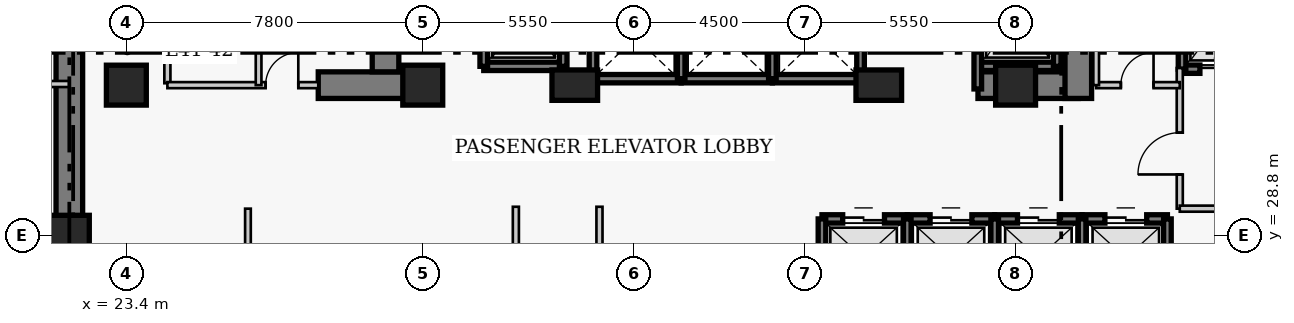
"""IFC4 building model, lengths in metres.
Left out: names, types, materials, properties, quantities, classifications, styles, units other than length and angle.
Written with IfcOpenShell. Run it as: python <this file> out.ifc"""

import sys

from ifc_helpers import new_model, si_unit, direction, frame, frame_2d, origin, origin_2d, place, context, subcontext, project, spatial, rectangle, extrude, element, fill, save


model = new_model("IFC4")
c1 = context("Model", 3, precision=1e-05, world=origin(), true_north=direction((0.0, 1.0)))
c2 = subcontext(c1, "Body", "Model", "MODEL_VIEW")
j1 = project(units=[si_unit("LENGTHUNIT", "METRE"), si_unit("PLANEANGLEUNIT", "RADIAN")], contexts=[c1])
p1 = place(None, origin())
s1 = spatial("IfcSite", under=j1, at=p1, CompositionType="ELEMENT")
p2 = place(p1, origin())
s2 = spatial("IfcBuilding", under=s1, at=p2, CompositionType="ELEMENT")
p3 = place(p2, frame((0.0, 0.0, 165.0)))
s3 = spatial("IfcBuildingStorey", under=s2, at=p3, CompositionType="ELEMENT", Elevation=165.0)
p4 = place(p3, frame((21.9, 27.05, 0.0), z_axis=(0.0, 0.0, 1.0), x_axis=(0.0, 1.0, 0.0)))
e1 = element("IfcWall", 1, at=p4, inside=s3, PredefinedType="SHEAR", context=c2, shape_type="SweptSolid", body=[
    extrude(rectangle(XDim=13.62, YDim=0.7, at=frame_2d((6.81, 0.0))), origin(), (0.0, 0.0, 1.0), 3.8),
])
p5 = place(p3, frame((28.45, 32.75, 0.0), z_axis=(0.0, 0.0, 1.0), x_axis=(1.0, 0.0, 0.0)))
e2 = element("IfcWall", 2, at=p5, inside=s3, PredefinedType="SHEAR", context=c2, shape_type="SweptSolid", body=[
    extrude(rectangle(XDim=2.4, YDim=0.7, at=frame_2d((1.2, 0.0))), origin(), (0.0, 0.0, 1.0), 3.8),
])
p6 = place(p3, frame((45.81, 32.75, 0.0), z_axis=(0.0, 0.0, 1.0), x_axis=(1.0, 0.0, 0.0)))
e3 = element("IfcWall", 3, at=p6, inside=s3, PredefinedType="SHEAR", context=c2, shape_type="SweptSolid", body=[
    extrude(rectangle(XDim=2.64, YDim=0.7, at=frame_2d((1.32, 0.0))), origin(), (0.0, 0.0, 1.0), 3.8),
])
p7 = place(p3, frame((30.22, 33.1, 0.0), z_axis=(0.0, 0.0, 1.0), x_axis=(0.0, 1.0, 0.0)))
e4 = element("IfcWall", 4, at=p7, inside=s3, PredefinedType="SHEAR", context=c2, shape_type="SweptSolid", body=[
    extrude(rectangle(XDim=7.22, YDim=0.7, at=frame_2d((3.61, 0.0))), origin(), (0.0, 0.0, 1.0), 3.8),
])
p8 = place(p3, frame((48.45, 32.4, 0.0), z_axis=(0.0, 0.0, 1.0), x_axis=(0.0, 1.0, 0.0)))
e5 = element("IfcWall", 5, at=p8, inside=s3, PredefinedType="SHEAR", context=c2, shape_type="SweptSolid", body=[
    extrude(rectangle(XDim=7.92, YDim=0.7, at=frame_2d((3.96, 0.0))), origin(), (0.0, 0.0, 1.0), 3.8),
])
p9 = place(p8, frame((5.8, 0.0, 0.0)))
e6 = element("IfcOpeningElement", 6, at=p9, cuts=e5, PredefinedType="OPENING", context=c2, shape_type="SweptSolid", body=[
    extrude(rectangle(XDim=1.1, YDim=2.15, at=frame_2d((0.55, 1.075))), frame((0.0, 0.36, 0.0), z_axis=(0.0, -1.0, 0.0), x_axis=(1.0, 0.0, 0.0)), (0.0, 0.0, 1.0), 0.72),
])
for number, where, z_axis, x_axis in (
    (7, (21.9, 28.8, 0.0), (0.0, 0.0, 1.0), (1.0, 0.0, 0.0)),
    (8, (23.4, 32.75, 0.0), (0.0, 0.0, 1.0), (1.0, 0.0, 0.0)),
    (9, (31.2, 32.75, 0.0), (0.0, 0.0, 1.0), (1.0, 0.0, 0.0)),
):
    element("IfcColumn", number, at=place(p3, frame(where, z_axis=z_axis, x_axis=x_axis)), inside=s3, PredefinedType="COLUMN", context=c2, shape_type="SweptSolid", body=[
        extrude(rectangle(XDim=1.05, YDim=1.05, at=origin_2d()), origin(), (0.0, 0.0, 1.0), 3.8),
    ])
for number, where, z_axis, x_axis in (
    (10, (35.2, 32.75, 0.0), (0.0, 0.0, 1.0), (1.0, 0.0, 0.0)),
    (11, (43.2, 32.75, 0.0), (0.0, 0.0, 1.0), (1.0, 0.0, 0.0)),
):
    element("IfcColumn", number, at=place(p3, frame(where, z_axis=z_axis, x_axis=x_axis)), inside=s3, PredefinedType="COLUMN", context=c2, shape_type="SweptSolid", body=[
        extrude(rectangle(XDim=1.2, YDim=0.8, at=origin_2d()), origin(), (0.0, 0.0, 1.0), 3.8),
    ])
p10 = place(p3, frame((46.8, 32.75, 0.0), z_axis=(0.0, 0.0, 1.0), x_axis=(1.0, 0.0, 0.0)))
e12 = element("IfcColumn", 12, at=p10, inside=s3, PredefinedType="COLUMN", context=c2, shape_type="SweptSolid", body=[
    extrude(rectangle(XDim=1.05, YDim=1.05, at=origin_2d()), origin(), (0.0, 0.0, 1.0), 3.8),
])
p11 = place(p3, frame((41.705, 29.23, 0.0), z_axis=(0.0, 0.0, 1.0), x_axis=(1.0, 0.0, 0.0)))
e13 = element("IfcWall", 13, at=p11, inside=s3, PredefinedType="SHEAR", context=c2, shape_type="SweptSolid", body=[
    extrude(rectangle(XDim=2.245, YDim=0.22, at=frame_2d((1.123, 0.0))), origin(), (0.0, 0.0, 1.0), 3.8),
])
p12 = place(p11, frame((0.545, 0.0, 0.0)))
e14 = element("IfcOpeningElement", 14, at=p12, cuts=e13, PredefinedType="OPENING", context=c2, shape_type="SweptSolid", body=[
    extrude(rectangle(XDim=1.1, YDim=2.15, at=frame_2d((0.55, 1.075))), frame((0.0, 0.12, 0.0), z_axis=(0.0, -1.0, 0.0), x_axis=(1.0, 0.0, 0.0)), (0.0, 0.0, 1.0), 0.24),
])
p13 = place(p3, frame((41.705, 27.17, 0.0), z_axis=(0.0, 0.0, 1.0), x_axis=(0.0, 1.0, 0.0)))
e15 = element("IfcWall", 15, at=p13, inside=s3, PredefinedType="SHEAR", context=c2, shape_type="SweptSolid", body=[
    extrude(rectangle(XDim=2.06, YDim=0.2, at=frame_2d((1.03, 0.0))), origin(), (0.0, 0.0, 1.0), 3.8),
])
p14 = place(p3, frame((43.95, 29.23, 0.0), z_axis=(0.0, 0.0, 1.0), x_axis=(1.0, 0.0, 0.0)))
e16 = element("IfcWall", 16, at=p14, inside=s3, PredefinedType="SHEAR", context=c2, shape_type="SweptSolid", body=[
    extrude(rectangle(XDim=2.3, YDim=0.22, at=frame_2d((1.15, 0.0))), origin(), (0.0, 0.0, 1.0), 3.8),
])
p15 = place(p14, frame((0.6, 0.0, 0.0)))
e17 = element("IfcOpeningElement", 17, at=p15, cuts=e16, PredefinedType="OPENING", context=c2, shape_type="SweptSolid", body=[
    extrude(rectangle(XDim=1.1, YDim=2.15, at=frame_2d((0.55, 1.075))), frame((0.0, 0.12, 0.0), z_axis=(0.0, -1.0, 0.0), x_axis=(1.0, 0.0, 0.0)), (0.0, 0.0, 1.0), 0.24),
])
p16 = place(p3, frame((43.95, 27.17, 0.0), z_axis=(0.0, 0.0, 1.0), x_axis=(0.0, 1.0, 0.0)))
e18 = element("IfcWall", 18, at=p16, inside=s3, PredefinedType="SHEAR", context=c2, shape_type="SweptSolid", body=[
    extrude(rectangle(XDim=2.06, YDim=0.2, at=frame_2d((1.03, 0.0))), origin(), (0.0, 0.0, 1.0), 3.8),
])
p17 = place(p3, frame((46.25, 29.23, 0.0), z_axis=(0.0, 0.0, 1.0), x_axis=(1.0, 0.0, 0.0)))
e19 = element("IfcWall", 19, at=p17, inside=s3, PredefinedType="SHEAR", context=c2, shape_type="SweptSolid", body=[
    extrude(rectangle(XDim=2.3, YDim=0.22, at=frame_2d((1.15, 0.0))), origin(), (0.0, 0.0, 1.0), 3.8),
])
p18 = place(p17, frame((0.6, 0.0, 0.0)))
e20 = element("IfcOpeningElement", 20, at=p18, cuts=e19, PredefinedType="OPENING", context=c2, shape_type="SweptSolid", body=[
    extrude(rectangle(XDim=1.1, YDim=2.15, at=frame_2d((0.55, 1.075))), frame((0.0, 0.12, 0.0), z_axis=(0.0, -1.0, 0.0), x_axis=(1.0, 0.0, 0.0)), (0.0, 0.0, 1.0), 0.24),
])
p19 = place(p3, frame((46.25, 27.17, 0.0), z_axis=(0.0, 0.0, 1.0), x_axis=(0.0, 1.0, 0.0)))
e21 = element("IfcWall", 21, at=p19, inside=s3, PredefinedType="SHEAR", context=c2, shape_type="SweptSolid", body=[
    extrude(rectangle(XDim=2.06, YDim=0.2, at=frame_2d((1.03, 0.0))), origin(), (0.0, 0.0, 1.0), 3.8),
])
p20 = place(p3, frame((48.55, 29.23, 0.0), z_axis=(0.0, 0.0, 1.0), x_axis=(1.0, 0.0, 0.0)))
e22 = element("IfcWall", 22, at=p20, inside=s3, PredefinedType="SHEAR", context=c2, shape_type="SweptSolid", body=[
    extrude(rectangle(XDim=2.245, YDim=0.22, at=frame_2d((1.123, 0.0))), origin(), (0.0, 0.0, 1.0), 3.8),
])
p21 = place(p20, frame((0.6, 0.0, 0.0)))
e23 = element("IfcOpeningElement", 23, at=p21, cuts=e22, PredefinedType="OPENING", context=c2, shape_type="SweptSolid", body=[
    extrude(rectangle(XDim=1.1, YDim=2.15, at=frame_2d((0.55, 1.075))), frame((0.0, 0.12, 0.0), z_axis=(0.0, -1.0, 0.0), x_axis=(1.0, 0.0, 0.0)), (0.0, 0.0, 1.0), 0.24),
])
for number, where, z_axis, x_axis in (
    (24, (48.55, 27.17, 0.0), (0.0, 0.0, 1.0), (0.0, 1.0, 0.0)),
    (25, (50.795, 27.17, 0.0), (0.0, 0.0, 1.0), (0.0, 1.0, 0.0)),
):
    element("IfcWall", number, at=place(p3, frame(where, z_axis=z_axis, x_axis=x_axis)), inside=s3, PredefinedType="SHEAR", context=c2, shape_type="SweptSolid", body=[
        extrude(rectangle(XDim=2.06, YDim=0.2, at=frame_2d((1.03, 0.0))), origin(), (0.0, 0.0, 1.0), 3.8),
    ])
p22 = place(p3, frame((35.68, 32.92, 0.0), z_axis=(0.0, 0.0, 1.0), x_axis=(1.0, 0.0, 0.0)))
e26 = element("IfcWall", 26, at=p22, inside=s3, PredefinedType="SHEAR", context=c2, shape_type="SweptSolid", body=[
    extrude(rectangle(XDim=2.32, YDim=0.22, at=frame_2d((1.16, 0.0))), origin(), (0.0, 0.0, 1.0), 3.8),
])
p23 = place(p3, frame((35.68, 32.92, 0.0), z_axis=(0.0, 0.0, 1.0), x_axis=(0.0, 1.0, 0.0)))
e27 = element("IfcWall", 27, at=p23, inside=s3, PredefinedType="SHEAR", context=c2, shape_type="SweptSolid", body=[
    extrude(rectangle(XDim=2.16, YDim=0.2, at=frame_2d((1.08, 0.0))), origin(), (0.0, 0.0, 1.0), 3.8),
])
p24 = place(p3, frame((38.0, 32.92, 0.0), z_axis=(0.0, 0.0, 1.0), x_axis=(1.0, 0.0, 0.0)))
e28 = element("IfcWall", 28, at=p24, inside=s3, PredefinedType="SHEAR", context=c2, shape_type="SweptSolid", body=[
    extrude(rectangle(XDim=2.4, YDim=0.22, at=frame_2d((1.2, 0.0))), origin(), (0.0, 0.0, 1.0), 3.8),
])
p25 = place(p3, frame((38.0, 32.92, 0.0), z_axis=(0.0, 0.0, 1.0), x_axis=(0.0, 1.0, 0.0)))
e29 = element("IfcWall", 29, at=p25, inside=s3, PredefinedType="SHEAR", context=c2, shape_type="SweptSolid", body=[
    extrude(rectangle(XDim=2.16, YDim=0.2, at=frame_2d((1.08, 0.0))), origin(), (0.0, 0.0, 1.0), 3.8),
])
p26 = place(p3, frame((40.4, 32.92, 0.0), z_axis=(0.0, 0.0, 1.0), x_axis=(1.0, 0.0, 0.0)))
e30 = element("IfcWall", 30, at=p26, inside=s3, PredefinedType="SHEAR", context=c2, shape_type="SweptSolid", body=[
    extrude(rectangle(XDim=2.32, YDim=0.22, at=frame_2d((1.16, 0.0))), origin(), (0.0, 0.0, 1.0), 3.8),
])
for number, where, z_axis, x_axis in (
    (31, (40.4, 32.92, 0.0), (0.0, 0.0, 1.0), (0.0, 1.0, 0.0)),
    (32, (42.72, 32.92, 0.0), (0.0, 0.0, 1.0), (0.0, 1.0, 0.0)),
):
    element("IfcWall", number, at=place(p3, frame(where, z_axis=z_axis, x_axis=x_axis)), inside=s3, PredefinedType="SHEAR", context=c2, shape_type="SweptSolid", body=[
        extrude(rectangle(XDim=2.16, YDim=0.2, at=frame_2d((1.08, 0.0))), origin(), (0.0, 0.0, 1.0), 3.8),
    ])
p27 = place(p3, frame((51.18, 33.17, 0.0), z_axis=(0.0, 0.0, 1.0), x_axis=(1.0, 0.0, 0.0)))
e33 = element("IfcWall", 33, at=p27, inside=s3, PredefinedType="SHEAR", context=c2, shape_type="SweptSolid", body=[
    extrude(rectangle(XDim=2.42, YDim=0.22, at=frame_2d((1.21, 0.0))), origin(), (0.0, 0.0, 1.0), 3.8),
])
p28 = place(p27, frame((0.47, 0.0, 0.0)))
e34 = element("IfcOpeningElement", 34, at=p28, cuts=e33, PredefinedType="OPENING", context=c2, shape_type="SweptSolid", body=[
    extrude(rectangle(XDim=1.3, YDim=2.15, at=frame_2d((0.65, 1.075))), frame((0.0, 0.12, 0.0), z_axis=(0.0, -1.0, 0.0), x_axis=(1.0, 0.0, 0.0)), (0.0, 0.0, 1.0), 0.24),
])
p29 = place(p3, frame((51.18, 33.17, 0.0), z_axis=(0.0, 0.0, 1.0), x_axis=(0.0, 1.0, 0.0)))
e35 = element("IfcWall", 35, at=p29, inside=s3, PredefinedType="SHEAR", context=c2, shape_type="SweptSolid", body=[
    extrude(rectangle(XDim=2.86, YDim=0.2, at=frame_2d((1.43, 0.0))), origin(), (0.0, 0.0, 1.0), 3.8),
])
p30 = place(p3, frame((32.805, 33.245, 0.0), z_axis=(0.0, 0.0, 1.0), x_axis=(1.0, 0.0, 0.0)))
e36 = element("IfcWall", 36, at=p30, inside=s3, PredefinedType="SHEAR", context=c2, shape_type="SweptSolid", body=[
    extrude(rectangle(XDim=2.09, YDim=0.22, at=frame_2d((1.045, 0.0))), origin(), (0.0, 0.0, 1.0), 3.8),
])
for number, where, z_axis, x_axis in (
    (37, (32.805, 33.245, 0.0), (0.0, 0.0, 1.0), (0.0, 1.0, 0.0)),
    (38, (34.895, 33.245, 0.0), (0.0, 0.0, 1.0), (0.0, 1.0, 0.0)),
):
    element("IfcWall", number, at=place(p3, frame(where, z_axis=z_axis, x_axis=x_axis)), inside=s3, PredefinedType="SHEAR", context=c2, shape_type="SweptSolid", body=[
        extrude(rectangle(XDim=2.91, YDim=0.2, at=frame_2d((1.455, 0.0))), origin(), (0.0, 0.0, 1.0), 3.8),
    ])
p31 = place(p3, frame((45.805, 33.245, 0.0), z_axis=(0.0, 0.0, 1.0), x_axis=(1.0, 0.0, 0.0)))
e39 = element("IfcWall", 39, at=p31, inside=s3, PredefinedType="SHEAR", context=c2, shape_type="SweptSolid", body=[
    extrude(rectangle(XDim=2.09, YDim=0.22, at=frame_2d((1.045, 0.0))), origin(), (0.0, 0.0, 1.0), 3.8),
])
p32 = place(p3, frame((45.805, 32.65, 0.0), z_axis=(0.0, 0.0, 1.0), x_axis=(0.0, 1.0, 0.0)))
e40 = element("IfcWall", 40, at=p32, inside=s3, PredefinedType="SHEAR", context=c2, shape_type="SweptSolid", body=[
    extrude(rectangle(XDim=3.505, YDim=0.2, at=frame_2d((1.752, 0.0))), origin(), (0.0, 0.0, 1.0), 3.8),
])
p33 = place(p3, frame((47.895, 33.245, 0.0), z_axis=(0.0, 0.0, 1.0), x_axis=(0.0, 1.0, 0.0)))
e41 = element("IfcWall", 41, at=p33, inside=s3, PredefinedType="SHEAR", context=c2, shape_type="SweptSolid", body=[
    extrude(rectangle(XDim=2.91, YDim=0.2, at=frame_2d((1.455, 0.0))), origin(), (0.0, 0.0, 1.0), 3.8),
])
p34 = place(p3, frame((24.48, 32.8, 0.0), z_axis=(0.0, 0.0, 1.0), x_axis=(0.0, 1.0, 0.0)))
e42 = element("IfcWall", 42, at=p34, inside=s3, PredefinedType="PARTITIONING", context=c2, shape_type="SweptSolid", body=[
    extrude(rectangle(XDim=3.57, YDim=0.16, at=frame_2d((1.785, 0.0))), origin(), (0.0, 0.0, 1.0), 3.55),
])
p35 = place(p34, frame((1.604, 0.0, 0.0)))
e43 = element("IfcOpeningElement", 43, at=p35, cuts=e42, PredefinedType="OPENING", context=c2, shape_type="SweptSolid", body=[
    extrude(rectangle(XDim=0.9, YDim=2.1, at=frame_2d((0.45, 1.05))), frame((0.0, 0.09, 0.0), z_axis=(0.0, -1.0, 0.0), x_axis=(1.0, 0.0, 0.0)), (0.0, 0.0, 1.0), 0.18),
])
p36 = place(p3, frame((51.12, 29.5, 0.0), z_axis=(0.0, 0.0, 1.0), x_axis=(0.0, 1.0, 0.0)))
e44 = element("IfcWall", 44, at=p36, inside=s3, PredefinedType="PARTITIONING", context=c2, shape_type="SweptSolid", body=[
    extrude(rectangle(XDim=3.7, YDim=0.16, at=frame_2d((1.85, 0.0))), origin(), (0.0, 0.0, 1.0), 3.55),
])
p37 = place(p36, frame((0.9, 0.0, 0.0)))
e45 = element("IfcOpeningElement", 45, at=p37, cuts=e44, PredefinedType="OPENING", context=c2, shape_type="SweptSolid", body=[
    extrude(rectangle(XDim=1.1, YDim=2.15, at=frame_2d((0.55, 1.075))), frame((0.0, 0.09, 0.0), z_axis=(0.0, -1.0, 0.0), x_axis=(1.0, 0.0, 0.0)), (0.0, 0.0, 1.0), 0.18),
])
p38 = place(p3, frame((51.12, 29.5, 0.0), z_axis=(0.0, 0.0, 1.0), x_axis=(1.0, 0.0, 0.0)))
e46 = element("IfcWall", 46, at=p38, inside=s3, PredefinedType="PARTITIONING", context=c2, shape_type="SweptSolid", body=[
    extrude(rectangle(XDim=5.63, YDim=0.16, at=frame_2d((2.815, 0.0))), origin(), (0.0, 0.0, 1.0), 3.55),
])
p39 = place(p3, frame((24.48, 32.75, 0.0), z_axis=(0.0, 0.0, 1.0), x_axis=(1.0, 0.0, 0.0)))
e47 = element("IfcWall", 47, at=p39, inside=s3, PredefinedType="PARTITIONING", context=c2, shape_type="SweptSolid", body=[
    extrude(rectangle(XDim=3.97, YDim=0.16, at=frame_2d((1.985, 0.0))), origin(), (0.0, 0.0, 1.0), 3.55),
])
p40 = place(p39, frame((2.585, 0.0, 0.0)))
e48 = element("IfcOpeningElement", 48, at=p40, cuts=e47, PredefinedType="OPENING", context=c2, shape_type="SweptSolid", body=[
    extrude(rectangle(XDim=0.86, YDim=2.05, at=frame_2d((0.43, 1.025))), frame((0.0, 0.09, 0.0), z_axis=(0.0, -1.0, 0.0), x_axis=(1.0, 0.0, 0.0)), (0.0, 0.0, 1.0), 0.18),
])
p41 = place(p3, frame((48.92, 32.75, 0.0), z_axis=(0.0, 0.0, 1.0), x_axis=(1.0, 0.0, 0.0)))
e49 = element("IfcWall", 49, at=p41, inside=s3, PredefinedType="PARTITIONING", context=c2, shape_type="SweptSolid", body=[
    extrude(rectangle(XDim=2.2, YDim=0.16, at=frame_2d((1.1, 0.0))), origin(), (0.0, 0.0, 1.0), 3.55),
])
p42 = place(p41, frame((0.65, 0.0, 0.0)))
e50 = element("IfcOpeningElement", 50, at=p42, cuts=e49, PredefinedType="OPENING", context=c2, shape_type="SweptSolid", body=[
    extrude(rectangle(XDim=0.86, YDim=2.05, at=frame_2d((0.43, 1.025))), frame((0.0, 0.09, 0.0), z_axis=(0.0, -1.0, 0.0), x_axis=(1.0, 0.0, 0.0)), (0.0, 0.0, 1.0), 0.18),
])
for number, where, z_axis, x_axis in (
    (51, (48.92, 32.75, 0.0), (0.0, 0.0, 1.0), (0.0, 1.0, 0.0)),
    (52, (26.88, 32.75, 0.0), (0.0, 0.0, 1.0), (0.0, 1.0, 0.0)),
):
    element("IfcWall", number, at=place(p3, frame(where, z_axis=z_axis, x_axis=x_axis)), inside=s3, PredefinedType="PARTITIONING", context=c2, shape_type="SweptSolid", body=[
        extrude(rectangle(XDim=3.62, YDim=0.15, at=frame_2d((1.81, 0.0))), origin(), (0.0, 0.0, 1.0), 3.55),
    ])
for number, where, z_axis, x_axis in (
    (53, (33.65, 17.96, 0.0), (0.0, 0.0, 1.0), (0.0, 1.0, 0.0)),
    (54, (35.85, 17.96, 0.0), (0.0, 0.0, 1.0), (0.0, 1.0, 0.0)),
):
    element("IfcWall", number, at=place(p3, frame(where, z_axis=z_axis, x_axis=x_axis)), inside=s3, PredefinedType="PARTITIONING", context=c2, shape_type="SweptSolid", body=[
        extrude(rectangle(XDim=11.59, YDim=0.16, at=frame_2d((5.795, 0.0))), origin(), (0.0, 0.0, 1.0), 3.55),
    ])
p43 = place(p3, frame((18.86, 32.78, 0.0), z_axis=(0.0, 0.0, 1.0), x_axis=(1.0, 0.0, 0.0)))
e55 = element("IfcWall", 55, at=p43, inside=s3, PredefinedType="PARTITIONING", context=c2, shape_type="SweptSolid", body=[
    extrude(rectangle(XDim=3.04, YDim=0.16, at=frame_2d((1.52, 0.0))), origin(), (0.0, 0.0, 1.0), 3.55),
])
p44 = place(p3, frame((26.6, 17.96, 0.0), z_axis=(0.0, 0.0, 1.0), x_axis=(0.0, 1.0, 0.0)))
e56 = element("IfcWall", 56, at=p44, inside=s3, PredefinedType="PARTITIONING", context=c2, shape_type="SweptSolid", body=[
    extrude(rectangle(XDim=11.54, YDim=0.15, at=frame_2d((5.77, 0.0))), origin(), (0.0, 0.0, 1.0), 3.55),
])
p45 = place(p12, origin())
e57 = element("IfcDoor", 57, at=p45, inside=s3, OperationType="DOUBLE_DOOR_SLIDING", PredefinedType="DOOR", context=c2, shape_type="SweptSolid", body=[
    extrude(rectangle(XDim=1.1, YDim=2.15, at=frame_2d((0.55, 1.075))), frame((0.0, 0.025, 0.0), z_axis=(0.0, -1.0, 0.0), x_axis=(1.0, 0.0, 0.0)), (0.0, 0.0, 1.0), 0.05),
])
fill(e14, e57)
p46 = place(p15, origin())
e58 = element("IfcDoor", 58, at=p46, inside=s3, OperationType="DOUBLE_DOOR_SLIDING", PredefinedType="DOOR", context=c2, shape_type="SweptSolid", body=[
    extrude(rectangle(XDim=1.1, YDim=2.15, at=frame_2d((0.55, 1.075))), frame((0.0, 0.025, 0.0), z_axis=(0.0, -1.0, 0.0), x_axis=(1.0, 0.0, 0.0)), (0.0, 0.0, 1.0), 0.05),
])
fill(e17, e58)
p47 = place(p18, origin())
e59 = element("IfcDoor", 59, at=p47, inside=s3, OperationType="DOUBLE_DOOR_SLIDING", PredefinedType="DOOR", context=c2, shape_type="SweptSolid", body=[
    extrude(rectangle(XDim=1.1, YDim=2.15, at=frame_2d((0.55, 1.075))), frame((0.0, 0.025, 0.0), z_axis=(0.0, -1.0, 0.0), x_axis=(1.0, 0.0, 0.0)), (0.0, 0.0, 1.0), 0.05),
])
fill(e20, e59)
p48 = place(p21, origin())
e60 = element("IfcDoor", 60, at=p48, inside=s3, OperationType="DOUBLE_DOOR_SLIDING", PredefinedType="DOOR", context=c2, shape_type="SweptSolid", body=[
    extrude(rectangle(XDim=1.1, YDim=2.15, at=frame_2d((0.55, 1.075))), frame((0.0, 0.025, 0.0), z_axis=(0.0, -1.0, 0.0), x_axis=(1.0, 0.0, 0.0)), (0.0, 0.0, 1.0), 0.05),
])
fill(e23, e60)
p49 = place(p28, origin())
e61 = element("IfcDoor", 61, at=p49, inside=s3, OperationType="DOUBLE_DOOR_SLIDING", PredefinedType="DOOR", context=c2, shape_type="SweptSolid", body=[
    extrude(rectangle(XDim=1.3, YDim=2.15, at=frame_2d((0.65, 1.075))), frame((0.0, 0.025, 0.0), z_axis=(0.0, -1.0, 0.0), x_axis=(1.0, 0.0, 0.0)), (0.0, 0.0, 1.0), 0.05),
])
fill(e34, e61)
p50 = place(p37, origin())
e62 = element("IfcDoor", 62, at=p50, inside=s3, OperationType="SINGLE_SWING_LEFT", PredefinedType="DOOR", context=c2, shape_type="SweptSolid", body=[
    extrude(rectangle(XDim=1.1, YDim=2.15, at=frame_2d((0.55, 1.075))), frame((0.0, 0.025, 0.0), z_axis=(0.0, -1.0, 0.0), x_axis=(1.0, 0.0, 0.0)), (0.0, 0.0, 1.0), 0.05),
])
fill(e45, e62)
p51 = place(p40, origin())
e63 = element("IfcDoor", 63, at=p51, inside=s3, OperationType="SINGLE_SWING_RIGHT", PredefinedType="DOOR", context=c2, shape_type="SweptSolid", body=[
    extrude(rectangle(XDim=0.86, YDim=2.05, at=frame_2d((0.43, 1.025))), frame((0.0, 0.025, 0.0), z_axis=(0.0, -1.0, 0.0), x_axis=(1.0, 0.0, 0.0)), (0.0, 0.0, 1.0), 0.05),
])
fill(e48, e63)
p52 = place(p42, origin())
e64 = element("IfcDoor", 64, at=p52, inside=s3, OperationType="SINGLE_SWING_RIGHT", PredefinedType="DOOR", context=c2, shape_type="SweptSolid", body=[
    extrude(rectangle(XDim=0.86, YDim=2.05, at=frame_2d((0.43, 1.025))), frame((0.0, 0.025, 0.0), z_axis=(0.0, -1.0, 0.0), x_axis=(1.0, 0.0, 0.0)), (0.0, 0.0, 1.0), 0.05),
])
fill(e50, e64)
save(model, sys.argv[1])
